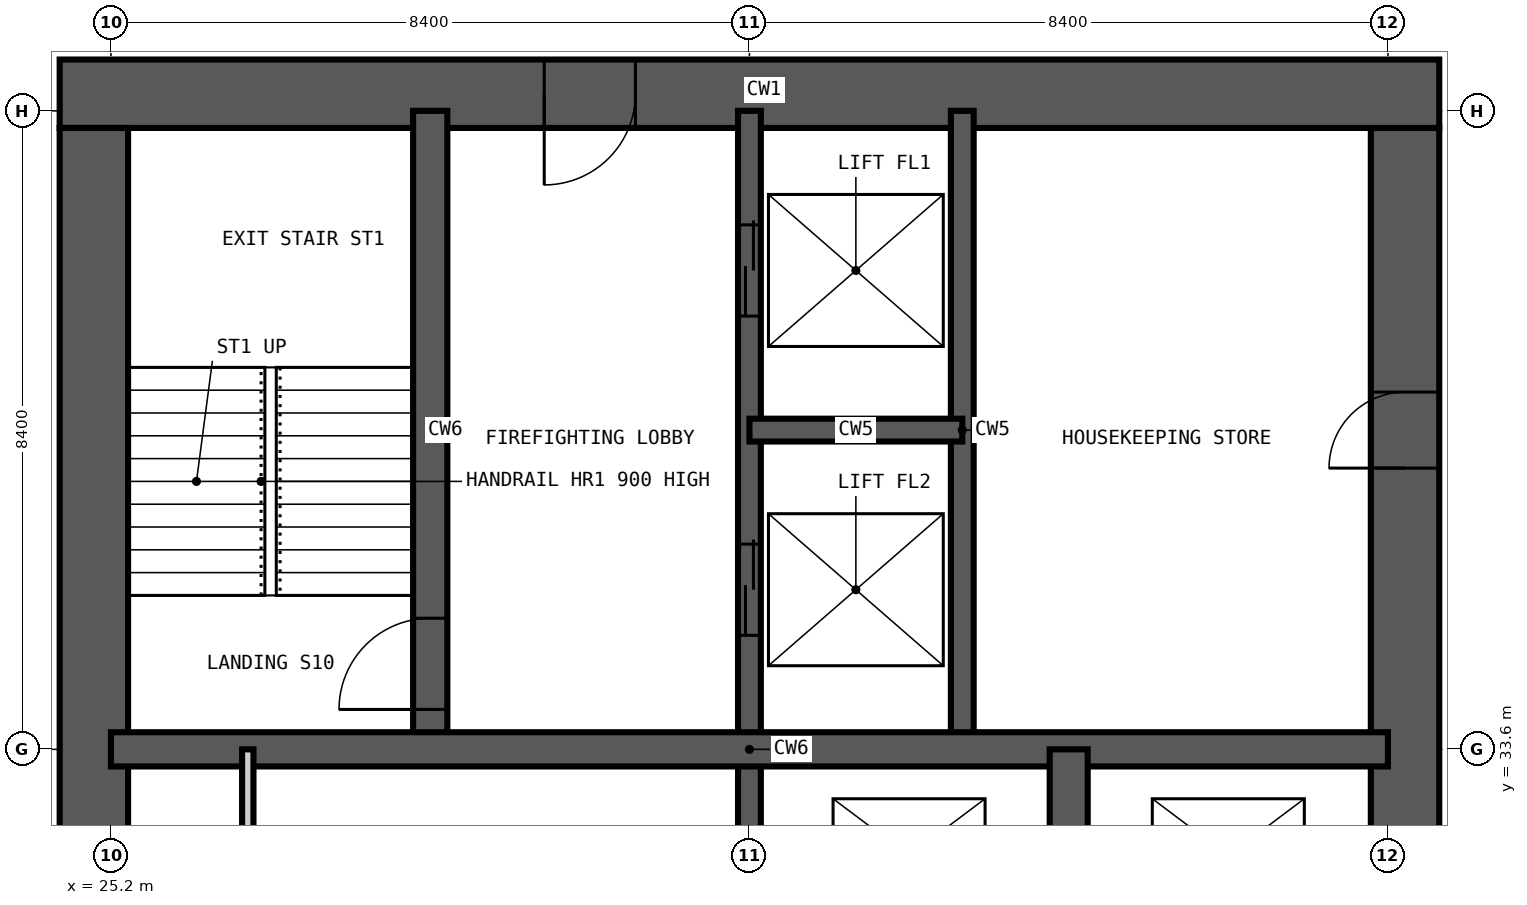
"""IFC4 building model, lengths in metres.
Left out: names, types, materials, properties, quantities, classifications, styles, units other than length and angle.
Written with IfcOpenShell. Run it as: python <this file> out.ifc"""

import sys

from ifc_helpers import new_model, si_unit, direction, frame, frame_2d, origin, place, context, subcontext, project, spatial, rectangle, extrude, element, fill, save


model = new_model("IFC4")
c1 = context("Model", 3, precision=1e-05, world=origin(), true_north=direction((0.0, 1.0)))
c2 = subcontext(c1, "Body", "Model", "MODEL_VIEW")
j1 = project(units=[si_unit("LENGTHUNIT", "METRE"), si_unit("PLANEANGLEUNIT", "RADIAN")], contexts=[c1])
p1 = place(None, origin())
s1 = spatial("IfcSite", under=j1, at=p1, CompositionType="ELEMENT")
p2 = place(p1, origin())
s2 = spatial("IfcBuilding", under=s1, at=p2, CompositionType="ELEMENT")
p3 = place(p2, frame((0.0, 0.0, 233.4)))
s3 = spatial("IfcBuildingStorey", under=s2, at=p3, CompositionType="ELEMENT", Elevation=233.4)
p4 = place(p3, frame((42.225, 17.025, -0.35), z_axis=(0.0, 0.0, 1.0), x_axis=(0.0, 1.0, 0.0)))
e1 = element("IfcWall", 1, at=p4, inside=s3, PredefinedType="SHEAR", context=c2, shape_type="SweptSolid", body=[
    extrude(rectangle(XDim=24.75, YDim=0.9, at=frame_2d((12.375, 0.0))), origin(), (0.0, 0.0, 1.0), 3.9),
])
p5 = place(p4, frame((0.575, 0.0, 0.35)))
e2 = element("IfcOpeningElement", 2, at=p5, cuts=e1, PredefinedType="OPENING", context=c2, shape_type="SweptSolid", body=[
    extrude(rectangle(XDim=1.2, YDim=2.2, at=frame_2d((0.6, 1.1))), frame((0.0, 0.46, 0.0), z_axis=(0.0, -1.0, 0.0), x_axis=(1.0, 0.0, 0.0)), (0.0, 0.0, 1.0), 0.92),
])
p6 = place(p4, frame((11.475, 0.0, 0.35)))
e3 = element("IfcOpeningElement", 3, at=p6, cuts=e1, PredefinedType="OPENING", context=c2, shape_type="SweptSolid", body=[
    extrude(rectangle(XDim=1.8, YDim=2.2, at=frame_2d((0.9, 1.1))), frame((0.0, 0.46, 0.0), z_axis=(0.0, -1.0, 0.0), x_axis=(1.0, 0.0, 0.0)), (0.0, 0.0, 1.0), 0.92),
])
p7 = place(p4, frame((20.275, 0.0, 0.35)))
e4 = element("IfcOpeningElement", 4, at=p7, cuts=e1, PredefinedType="OPENING", context=c2, shape_type="SweptSolid", body=[
    extrude(rectangle(XDim=1.0, YDim=2.1, at=frame_2d((0.5, 1.05))), frame((0.0, 0.46, 0.0), z_axis=(0.0, -1.0, 0.0), x_axis=(1.0, 0.0, 0.0)), (0.0, 0.0, 1.0), 0.92),
])
p8 = place(p3, frame((42.675, 42.225, -0.35), z_axis=(0.0, 0.0, 1.0), x_axis=(-1.0, 0.0, 0.0)))
e5 = element("IfcWall", 5, at=p8, inside=s3, PredefinedType="SHEAR", context=c2, shape_type="SweptSolid", body=[
    extrude(rectangle(XDim=18.15, YDim=0.9, at=frame_2d((9.075, 0.0))), origin(), (0.0, 0.0, 1.0), 3.9),
])
p9 = place(p8, frame((10.575, 0.0, 0.35)))
e6 = element("IfcOpeningElement", 6, at=p9, cuts=e5, PredefinedType="OPENING", context=c2, shape_type="SweptSolid", body=[
    extrude(rectangle(XDim=1.2, YDim=2.2, at=frame_2d((0.6, 1.1))), frame((0.0, 0.46, 0.0), z_axis=(0.0, -1.0, 0.0), x_axis=(1.0, 0.0, 0.0)), (0.0, 0.0, 1.0), 0.92),
])
p10 = place(p3, frame((24.975, 41.775, -0.35), z_axis=(0.0, 0.0, 1.0), x_axis=(0.0, -1.0, 0.0)))
e7 = element("IfcWall", 7, at=p10, inside=s3, PredefinedType="SHEAR", context=c2, shape_type="SweptSolid", body=[
    extrude(rectangle(XDim=24.75, YDim=0.9, at=frame_2d((12.375, 0.0))), origin(), (0.0, 0.0, 1.0), 3.9),
])
p11 = place(p10, frame((11.875, 0.0, 0.35)))
e8 = element("IfcOpeningElement", 8, at=p11, cuts=e7, PredefinedType="OPENING", context=c2, shape_type="SweptSolid", body=[
    extrude(rectangle(XDim=1.0, YDim=2.1, at=frame_2d((0.5, 1.05))), frame((0.0, 0.46, 0.0), z_axis=(0.0, -1.0, 0.0), x_axis=(1.0, 0.0, 0.0)), (0.0, 0.0, 1.0), 0.92),
])
p12 = place(p3, frame((33.6, 16.8, -0.35), z_axis=(0.0, 0.0, 1.0), x_axis=(0.0, 1.0, 0.0)))
e9 = element("IfcWall", 9, at=p12, inside=s3, PredefinedType="SHEAR", context=c2, shape_type="SweptSolid", body=[
    extrude(rectangle(XDim=25.2, YDim=0.3, at=frame_2d((12.6, 0.0))), origin(), (0.0, 0.0, 1.0), 3.9),
])
p13 = place(p12, frame((22.5, 0.0, 0.35)))
e10 = element("IfcOpeningElement", 10, at=p13, cuts=e9, PredefinedType="OPENING", context=c2, shape_type="SweptSolid", body=[
    extrude(rectangle(XDim=1.2, YDim=2.2, at=frame_2d((0.6, 1.1))), frame((0.0, 0.16, 0.0), z_axis=(0.0, -1.0, 0.0), x_axis=(1.0, 0.0, 0.0)), (0.0, 0.0, 1.0), 0.32),
])
p14 = place(p12, frame((18.3, 0.0, 0.35)))
e11 = element("IfcOpeningElement", 11, at=p14, cuts=e9, PredefinedType="OPENING", context=c2, shape_type="SweptSolid", body=[
    extrude(rectangle(XDim=1.2, YDim=2.2, at=frame_2d((0.6, 1.1))), frame((0.0, 0.16, 0.0), z_axis=(0.0, -1.0, 0.0), x_axis=(1.0, 0.0, 0.0)), (0.0, 0.0, 1.0), 0.32),
])
p15 = place(p12, frame((9.3, 0.0, 0.35)))
e12 = element("IfcOpeningElement", 12, at=p15, cuts=e9, PredefinedType="OPENING", context=c2, shape_type="SweptSolid", body=[
    extrude(rectangle(XDim=1.0, YDim=2.1, at=frame_2d((0.5, 1.05))), frame((0.0, 0.16, 0.0), z_axis=(0.0, -1.0, 0.0), x_axis=(1.0, 0.0, 0.0)), (0.0, 0.0, 1.0), 0.32),
])
p16 = place(p3, frame((36.4, 33.6, -0.35), z_axis=(0.0, 0.0, 1.0), x_axis=(0.0, 1.0, 0.0)))
e13 = element("IfcWall", 13, at=p16, inside=s3, PredefinedType="SHEAR", context=c2, shape_type="SweptSolid", body=[
    extrude(rectangle(XDim=8.4, YDim=0.3, at=frame_2d((4.2, 0.0))), origin(), (0.0, 0.0, 1.0), 3.9),
])
p17 = place(p3, frame((33.6, 37.8, -0.35), z_axis=(0.0, 0.0, 1.0), x_axis=(1.0, 0.0, 0.0)))
e14 = element("IfcWall", 14, at=p17, inside=s3, PredefinedType="SHEAR", context=c2, shape_type="SweptSolid", body=[
    extrude(rectangle(XDim=2.8, YDim=0.3, at=frame_2d((1.4, 0.0))), origin(), (0.0, 0.0, 1.0), 3.9),
])
p18 = place(p3, frame((29.4, 33.6, -0.35), z_axis=(0.0, 0.0, 1.0), x_axis=(0.0, 1.0, 0.0)))
e15 = element("IfcWall", 15, at=p18, inside=s3, PredefinedType="SHEAR", context=c2, shape_type="SweptSolid", body=[
    extrude(rectangle(XDim=8.4, YDim=0.45, at=frame_2d((4.2, 0.0))), origin(), (0.0, 0.0, 1.0), 3.9),
])
p19 = place(p18, frame((0.525, 0.0, 0.35)))
e16 = element("IfcOpeningElement", 16, at=p19, cuts=e15, PredefinedType="OPENING", context=c2, shape_type="SweptSolid", body=[
    extrude(rectangle(XDim=1.2, YDim=2.2, at=frame_2d((0.6, 1.1))), frame((0.0, 0.235, 0.0), z_axis=(0.0, -1.0, 0.0), x_axis=(1.0, 0.0, 0.0)), (0.0, 0.0, 1.0), 0.47),
])
p20 = place(p3, frame((25.2, 33.6, -0.35), z_axis=(0.0, 0.0, 1.0), x_axis=(1.0, 0.0, 0.0)))
e17 = element("IfcWall", 17, at=p20, inside=s3, PredefinedType="SHEAR", context=c2, shape_type="SweptSolid", body=[
    extrude(rectangle(XDim=16.8, YDim=0.45, at=frame_2d((8.4, 0.0))), origin(), (0.0, 0.0, 1.0), 3.9),
])
p21 = place(p3, frame((37.8, 30.8, -0.35), z_axis=(0.0, 0.0, 1.0), x_axis=(0.0, 1.0, 0.0)))
e18 = element("IfcWall", 18, at=p21, inside=s3, PredefinedType="SHEAR", context=c2, shape_type="SweptSolid", body=[
    extrude(rectangle(XDim=2.8, YDim=0.5, at=frame_2d((1.4, 0.0))), origin(), (0.0, 0.0, 1.0), 3.9),
])
p22 = place(p3, frame((27.0, 25.2, 0.0), z_axis=(0.0, 0.0, 1.0), x_axis=(0.0, 1.0, 0.0)))
e19 = element("IfcWall", 19, at=p22, inside=s3, PredefinedType="PARTITIONING", context=c2, shape_type="SweptSolid", body=[
    extrude(rectangle(XDim=8.4, YDim=0.15, at=frame_2d((4.2, 0.0))), origin(), (0.0, 0.0, 1.0), 3.55),
])
p23 = place(p22, frame((1.6, 0.0, 0.0)))
e20 = element("IfcOpeningElement", 20, at=p23, cuts=e19, PredefinedType="OPENING", context=c2, shape_type="SweptSolid", body=[
    extrude(rectangle(XDim=1.0, YDim=2.1, at=frame_2d((0.5, 1.05))), frame((0.0, 0.085, 0.0), z_axis=(0.0, -1.0, 0.0), x_axis=(1.0, 0.0, 0.0)), (0.0, 0.0, 1.0), 0.17),
])
p24 = place(p22, frame((5.8, 0.0, 0.0)))
e21 = element("IfcOpeningElement", 21, at=p24, cuts=e19, PredefinedType="OPENING", context=c2, shape_type="SweptSolid", body=[
    extrude(rectangle(XDim=1.0, YDim=2.1, at=frame_2d((0.5, 1.05))), frame((0.0, 0.085, 0.0), z_axis=(0.0, -1.0, 0.0), x_axis=(1.0, 0.0, 0.0)), (0.0, 0.0, 1.0), 0.17),
])
p25 = place(p19, origin())
e22 = element("IfcDoor", 22, at=p25, inside=s3, OperationType="SINGLE_SWING_LEFT", PredefinedType="DOOR", context=c2, shape_type="SweptSolid", body=[
    extrude(rectangle(XDim=1.2, YDim=2.2, at=frame_2d((0.6, 1.1))), frame((0.0, 0.025, 0.0), z_axis=(0.0, -1.0, 0.0), x_axis=(1.0, 0.0, 0.0)), (0.0, 0.0, 1.0), 0.05),
])
fill(e16, e22)
p26 = place(p13, origin())
e23 = element("IfcDoor", 23, at=p26, inside=s3, OperationType="DOUBLE_DOOR_SLIDING", PredefinedType="DOOR", context=c2, shape_type="SweptSolid", body=[
    extrude(rectangle(XDim=1.2, YDim=2.2, at=frame_2d((0.6, 1.1))), frame((0.0, 0.025, 0.0), z_axis=(0.0, -1.0, 0.0), x_axis=(1.0, 0.0, 0.0)), (0.0, 0.0, 1.0), 0.05),
])
fill(e10, e23)
p27 = place(p14, origin())
e24 = element("IfcDoor", 24, at=p27, inside=s3, OperationType="DOUBLE_DOOR_SLIDING", PredefinedType="DOOR", context=c2, shape_type="SweptSolid", body=[
    extrude(rectangle(XDim=1.2, YDim=2.2, at=frame_2d((0.6, 1.1))), frame((0.0, 0.025, 0.0), z_axis=(0.0, -1.0, 0.0), x_axis=(1.0, 0.0, 0.0)), (0.0, 0.0, 1.0), 0.05),
])
fill(e11, e24)
p28 = place(p9, origin())
e25 = element("IfcDoor", 25, at=p28, inside=s3, OperationType="SINGLE_SWING_RIGHT", PredefinedType="DOOR", context=c2, shape_type="SweptSolid", body=[
    extrude(rectangle(XDim=1.2, YDim=2.2, at=frame_2d((0.6, 1.1))), frame((0.0, 0.025, 0.0), z_axis=(0.0, -1.0, 0.0), x_axis=(1.0, 0.0, 0.0)), (0.0, 0.0, 1.0), 0.05),
])
fill(e6, e25)
p29 = place(p7, origin())
e26 = element("IfcDoor", 26, at=p29, inside=s3, OperationType="SINGLE_SWING_LEFT", PredefinedType="DOOR", context=c2, shape_type="SweptSolid", body=[
    extrude(rectangle(XDim=1.0, YDim=2.1, at=frame_2d((0.5, 1.05))), frame((0.0, 0.025, 0.0), z_axis=(0.0, -1.0, 0.0), x_axis=(1.0, 0.0, 0.0)), (0.0, 0.0, 1.0), 0.05),
])
fill(e4, e26)
save(model, sys.argv[1])
